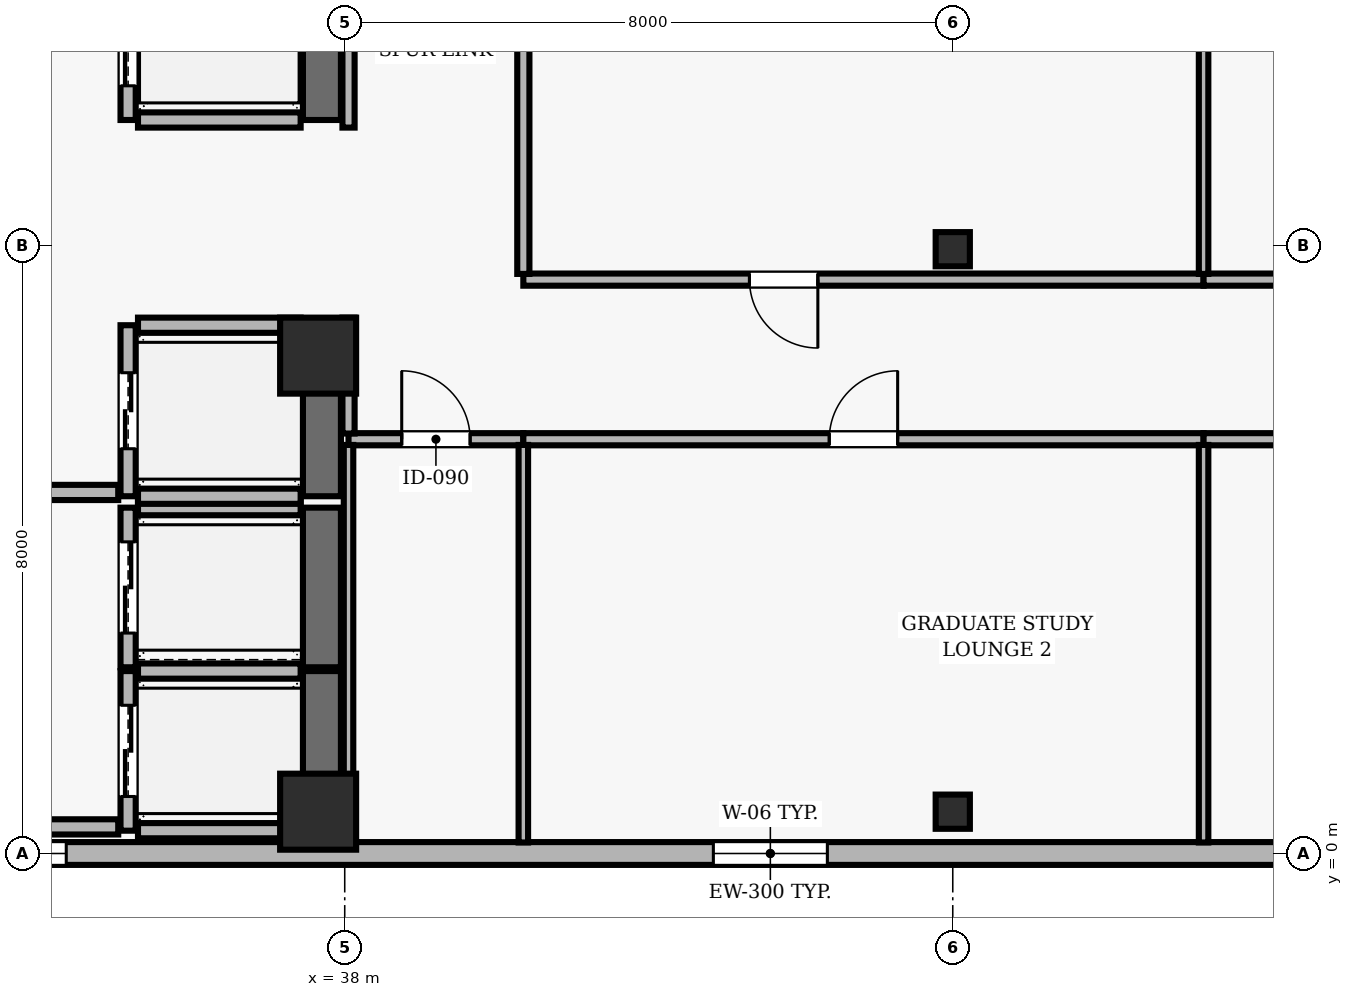
"""IFC4 building model, lengths in metres.
Left out: names, types, materials, properties, quantities, classifications, styles, units other than length and angle.
Written with IfcOpenShell. Run it as: python <this file> out.ifc"""

import sys

from ifc_helpers import new_model, si_unit, direction, frame, frame_2d, origin, origin_2d, place, context, subcontext, project, spatial, rectangle, hollow_rectangle, extrude, element, fill, save


model = new_model("IFC4")
c1 = context("Model", 3, precision=1e-05, world=origin(), true_north=direction((0.0, 1.0)))
c2 = subcontext(c1, "Body", "Model", "MODEL_VIEW")
j1 = project(units=[si_unit("LENGTHUNIT", "METRE"), si_unit("PLANEANGLEUNIT", "RADIAN")], contexts=[c1])
p1 = place(None, origin())
s1 = spatial("IfcSite", under=j1, at=p1, CompositionType="ELEMENT")
p2 = place(p1, origin())
s2 = spatial("IfcBuilding", under=s1, at=p2, CompositionType="ELEMENT")
p3 = place(p2, frame((0.0, 0.0, 218.7)))
s3 = spatial("IfcBuildingStorey", under=s2, at=p3, CompositionType="ELEMENT", Elevation=218.7)
for number, where, z_axis, x_axis in (
    (1, (37.65, 0.55, 0.0), (0.0, 0.0, 1.0), (1.0, 0.0, 0.0)),
    (2, (37.65, 6.55, 0.0), (0.0, 0.0, 1.0), (1.0, 0.0, 0.0)),
):
    element("IfcColumn", number, at=place(p3, frame(where, z_axis=z_axis, x_axis=x_axis)), inside=s3, PredefinedType="COLUMN", context=c2, shape_type="SweptSolid", body=[
        extrude(rectangle(XDim=1.0, YDim=1.0, at=origin_2d()), origin(), (0.0, 0.0, 1.0), 3.9),
    ])
for number, where, z_axis, x_axis in (
    (3, (46.0, 0.55, 0.0), (0.0, 0.0, 1.0), (1.0, 0.0, 0.0)),
    (4, (46.0, 7.95, 0.0), (0.0, 0.0, 1.0), (1.0, 0.0, 0.0)),
):
    element("IfcColumn", number, at=place(p3, frame(where, z_axis=z_axis, x_axis=x_axis)), inside=s3, PredefinedType="COLUMN", context=c2, shape_type="SweptSolid", body=[
        extrude(hollow_rectangle(XDim=0.45, YDim=0.45, WallThickness=0.02, at=origin_2d()), origin(), (0.0, 0.0, 1.0), 3.9),
    ])
p4 = place(p3, frame((24.5, 0.0, 0.0), z_axis=(0.0, 0.0, 1.0), x_axis=(1.0, 0.0, 0.0)))
e5 = element("IfcWall", 5, at=p4, inside=s3, PredefinedType="SOLIDWALL", context=c2, shape_type="SweptSolid", body=[
    extrude(rectangle(XDim=38.2, YDim=0.3, at=frame_2d((19.1, 0.0))), origin(), (0.0, 0.0, 1.0), 3.69),
])
p5 = place(p4, frame((1.979, 0.0, 0.9)))
e6 = element("IfcOpeningElement", 6, at=p5, cuts=e5, PredefinedType="OPENING", context=c2, shape_type="SweptSolid", body=[
    extrude(rectangle(XDim=1.5, YDim=1.8, at=frame_2d((0.75, 0.9))), frame((0.0, 0.16, 0.0), z_axis=(0.0, -1.0, 0.0), x_axis=(1.0, 0.0, 0.0)), (0.0, 0.0, 1.0), 0.32),
])
p6 = place(p4, frame((8.336, 0.0, 0.9)))
e7 = element("IfcOpeningElement", 7, at=p6, cuts=e5, PredefinedType="OPENING", context=c2, shape_type="SweptSolid", body=[
    extrude(rectangle(XDim=1.5, YDim=1.8, at=frame_2d((0.75, 0.9))), frame((0.0, 0.16, 0.0), z_axis=(0.0, -1.0, 0.0), x_axis=(1.0, 0.0, 0.0)), (0.0, 0.0, 1.0), 0.32),
])
p7 = place(p4, frame((18.35, 0.0, 0.9)))
e8 = element("IfcOpeningElement", 8, at=p7, cuts=e5, PredefinedType="OPENING", context=c2, shape_type="SweptSolid", body=[
    extrude(rectangle(XDim=1.5, YDim=1.8, at=frame_2d((0.75, 0.9))), frame((0.0, 0.16, 0.0), z_axis=(0.0, -1.0, 0.0), x_axis=(1.0, 0.0, 0.0)), (0.0, 0.0, 1.0), 0.32),
])
p8 = place(p4, frame((29.264, 0.0, 0.9)))
e9 = element("IfcOpeningElement", 9, at=p8, cuts=e5, PredefinedType="OPENING", context=c2, shape_type="SweptSolid", body=[
    extrude(rectangle(XDim=1.5, YDim=1.8, at=frame_2d((0.75, 0.9))), frame((0.0, 0.16, 0.0), z_axis=(0.0, -1.0, 0.0), x_axis=(1.0, 0.0, 0.0)), (0.0, 0.0, 1.0), 0.32),
])
p9 = place(p4, frame((34.721, 0.0, 0.9)))
e10 = element("IfcOpeningElement", 10, at=p9, cuts=e5, PredefinedType="OPENING", context=c2, shape_type="SweptSolid", body=[
    extrude(rectangle(XDim=1.5, YDim=1.8, at=frame_2d((0.75, 0.9))), frame((0.0, 0.16, 0.0), z_axis=(0.0, -1.0, 0.0), x_axis=(1.0, 0.0, 0.0)), (0.0, 0.0, 1.0), 0.32),
])
p10 = place(p3, frame((35.15, 2.4, 0.0), z_axis=(0.0, 0.0, 1.0), x_axis=(0.0, -1.0, 0.0)))
e11 = element("IfcWall", 11, at=p10, inside=s3, PredefinedType="SOLIDWALL", context=c2, shape_type="SweptSolid", body=[
    extrude(rectangle(XDim=2.1, YDim=0.2, at=frame_2d((1.05, 0.0))), origin(), (0.0, 0.0, 1.0), 3.69),
])
p11 = place(p10, frame((0.45, 0.0, 0.0)))
e12 = element("IfcOpeningElement", 12, at=p11, cuts=e11, PredefinedType="OPENING", context=c2, shape_type="SweptSolid", body=[
    extrude(rectangle(XDim=1.2, YDim=2.15, at=frame_2d((0.6, 1.075))), frame((0.0, 0.11, 0.0), z_axis=(0.0, -1.0, 0.0), x_axis=(1.0, 0.0, 0.0)), (0.0, 0.0, 1.0), 0.22),
])
p12 = place(p3, frame((37.7, 0.3, 0.0), z_axis=(0.0, 0.0, 1.0), x_axis=(0.0, 1.0, 0.0)))
e13 = element("IfcWall", 13, at=p12, inside=s3, PredefinedType="SHEAR", context=c2, shape_type="SweptSolid", body=[
    extrude(rectangle(XDim=2.1, YDim=0.5, at=frame_2d((1.05, 0.0))), origin(), (0.0, 0.0, 1.0), 3.69),
])
for number, where, z_axis, x_axis in (
    (14, (35.28, 0.3, 0.0), (0.0, 0.0, 1.0), (1.0, 0.0, 0.0)),
    (15, (37.42, 2.4, 0.0), (0.0, 0.0, 1.0), (-1.0, 0.0, 0.0)),
):
    element("IfcWall", number, at=place(p3, frame(where, z_axis=z_axis, x_axis=x_axis)), inside=s3, PredefinedType="SOLIDWALL", context=c2, shape_type="SweptSolid", body=[
        extrude(rectangle(XDim=2.14, YDim=0.2, at=frame_2d((1.07, 0.0))), origin(), (0.0, 0.0, 1.0), 3.69),
    ])
p13 = place(p3, frame((35.15, 4.55, 0.0), z_axis=(0.0, 0.0, 1.0), x_axis=(0.0, -1.0, 0.0)))
e16 = element("IfcWall", 16, at=p13, inside=s3, PredefinedType="SOLIDWALL", context=c2, shape_type="SweptSolid", body=[
    extrude(rectangle(XDim=2.1, YDim=0.2, at=frame_2d((1.05, 0.0))), origin(), (0.0, 0.0, 1.0), 3.69),
])
p14 = place(p13, frame((0.45, 0.0, 0.0)))
e17 = element("IfcOpeningElement", 17, at=p14, cuts=e16, PredefinedType="OPENING", context=c2, shape_type="SweptSolid", body=[
    extrude(rectangle(XDim=1.2, YDim=2.15, at=frame_2d((0.6, 1.075))), frame((0.0, 0.11, 0.0), z_axis=(0.0, -1.0, 0.0), x_axis=(1.0, 0.0, 0.0)), (0.0, 0.0, 1.0), 0.22),
])
p15 = place(p3, frame((37.7, 2.45, 0.0), z_axis=(0.0, 0.0, 1.0), x_axis=(0.0, 1.0, 0.0)))
e18 = element("IfcWall", 18, at=p15, inside=s3, PredefinedType="SHEAR", context=c2, shape_type="SweptSolid", body=[
    extrude(rectangle(XDim=2.1, YDim=0.5, at=frame_2d((1.05, 0.0))), origin(), (0.0, 0.0, 1.0), 3.69),
])
p16 = place(p3, frame((37.42, 4.55, 0.0), z_axis=(0.0, 0.0, 1.0), x_axis=(-1.0, 0.0, 0.0)))
e19 = element("IfcWall", 19, at=p16, inside=s3, PredefinedType="SOLIDWALL", context=c2, shape_type="SweptSolid", body=[
    extrude(rectangle(XDim=2.14, YDim=0.2, at=frame_2d((1.07, 0.0))), origin(), (0.0, 0.0, 1.0), 3.69),
])
p17 = place(p3, frame((35.15, 6.95, 0.0), z_axis=(0.0, 0.0, 1.0), x_axis=(0.0, -1.0, 0.0)))
e20 = element("IfcWall", 20, at=p17, inside=s3, PredefinedType="SOLIDWALL", context=c2, shape_type="SweptSolid", body=[
    extrude(rectangle(XDim=2.25, YDim=0.2, at=frame_2d((1.125, 0.0))), origin(), (0.0, 0.0, 1.0), 3.69),
])
p18 = place(p17, frame((0.625, 0.0, 0.0)))
e21 = element("IfcOpeningElement", 21, at=p18, cuts=e20, PredefinedType="OPENING", context=c2, shape_type="SweptSolid", body=[
    extrude(rectangle(XDim=1.0, YDim=2.1, at=frame_2d((0.5, 1.05))), frame((0.0, 0.11, 0.0), z_axis=(0.0, -1.0, 0.0), x_axis=(1.0, 0.0, 0.0)), (0.0, 0.0, 1.0), 0.22),
])
p19 = place(p3, frame((37.7, 4.7, 0.0), z_axis=(0.0, 0.0, 1.0), x_axis=(0.0, 1.0, 0.0)))
e22 = element("IfcWall", 22, at=p19, inside=s3, PredefinedType="SHEAR", context=c2, shape_type="SweptSolid", body=[
    extrude(rectangle(XDim=2.25, YDim=0.5, at=frame_2d((1.125, 0.0))), origin(), (0.0, 0.0, 1.0), 3.69),
])
for number, where, z_axis, x_axis in (
    (23, (35.28, 4.7, 0.0), (0.0, 0.0, 1.0), (1.0, 0.0, 0.0)),
    (24, (37.42, 6.95, 0.0), (0.0, 0.0, 1.0), (-1.0, 0.0, 0.0)),
):
    element("IfcWall", number, at=place(p3, frame(where, z_axis=z_axis, x_axis=x_axis)), inside=s3, PredefinedType="SOLIDWALL", context=c2, shape_type="SweptSolid", body=[
        extrude(rectangle(XDim=2.14, YDim=0.2, at=frame_2d((1.07, 0.0))), origin(), (0.0, 0.0, 1.0), 3.69),
    ])
p20 = place(p3, frame((35.15, 11.55, 0.0), z_axis=(0.0, 0.0, 1.0), x_axis=(0.0, -1.0, 0.0)))
e25 = element("IfcWall", 25, at=p20, inside=s3, PredefinedType="SOLIDWALL", context=c2, shape_type="SweptSolid", body=[
    extrude(rectangle(XDim=1.9, YDim=0.2, at=frame_2d((0.95, 0.0))), origin(), (0.0, 0.0, 1.0), 3.69),
])
p21 = place(p20, frame((0.45, 0.0, 0.0)))
e26 = element("IfcOpeningElement", 26, at=p21, cuts=e25, PredefinedType="OPENING", context=c2, shape_type="SweptSolid", body=[
    extrude(rectangle(XDim=1.0, YDim=2.1, at=frame_2d((0.5, 1.05))), frame((0.0, 0.11, 0.0), z_axis=(0.0, -1.0, 0.0), x_axis=(1.0, 0.0, 0.0)), (0.0, 0.0, 1.0), 0.22),
])
p22 = place(p3, frame((37.7, 9.65, 0.0), z_axis=(0.0, 0.0, 1.0), x_axis=(0.0, 1.0, 0.0)))
e27 = element("IfcWall", 27, at=p22, inside=s3, PredefinedType="SHEAR", context=c2, shape_type="SweptSolid", body=[
    extrude(rectangle(XDim=1.9, YDim=0.5, at=frame_2d((0.95, 0.0))), origin(), (0.0, 0.0, 1.0), 3.69),
])
p23 = place(p3, frame((35.28, 9.65, 0.0), z_axis=(0.0, 0.0, 1.0), x_axis=(1.0, 0.0, 0.0)))
e28 = element("IfcWall", 28, at=p23, inside=s3, PredefinedType="SOLIDWALL", context=c2, shape_type="SweptSolid", body=[
    extrude(rectangle(XDim=2.14, YDim=0.2, at=frame_2d((1.07, 0.0))), origin(), (0.0, 0.0, 1.0), 3.69),
])
p24 = place(p3, frame((31.65, 0.35, 0.0), z_axis=(0.0, 0.0, 1.0), x_axis=(1.0, 0.0, 0.0)))
e29 = element("IfcWall", 29, at=p24, inside=s3, PredefinedType="SOLIDWALL", context=c2, shape_type="SweptSolid", body=[
    extrude(rectangle(XDim=3.37, YDim=0.2, at=frame_2d((1.685, 0.0))), origin(), (0.0, 0.0, 1.0), 3.69),
])
p25 = place(p3, frame((35.02, 4.75, 0.0), z_axis=(0.0, 0.0, 1.0), x_axis=(-1.0, 0.0, 0.0)))
e30 = element("IfcWall", 30, at=p25, inside=s3, PredefinedType="SOLIDWALL", context=c2, shape_type="SweptSolid", body=[
    extrude(rectangle(XDim=3.11, YDim=0.2, at=frame_2d((1.555, 0.0))), origin(), (0.0, 0.0, 1.0), 3.69),
])
p26 = place(p25, frame((1.03, 0.0, 0.0)))
e31 = element("IfcOpeningElement", 31, at=p26, cuts=e30, PredefinedType="OPENING", context=c2, shape_type="SweptSolid", body=[
    extrude(rectangle(XDim=1.05, YDim=2.15, at=frame_2d((0.525, 1.075))), frame((0.0, 0.11, 0.0), z_axis=(0.0, -1.0, 0.0), x_axis=(1.0, 0.0, 0.0)), (0.0, 0.0, 1.0), 0.22),
])
p27 = place(p3, frame((38.05, 5.45, 0.0), z_axis=(0.0, 0.0, 1.0), x_axis=(1.0, 0.0, 0.0)))
e32 = element("IfcWall", 32, at=p27, inside=s3, PredefinedType="PARTITIONING", context=c2, shape_type="SweptSolid", body=[
    extrude(rectangle(XDim=2.3, YDim=0.16, at=frame_2d((1.15, 0.0))), origin(), (0.0, 0.0, 1.0), 3.372),
])
p28 = place(p27, frame((0.7, 0.0, 0.0)))
e33 = element("IfcOpeningElement", 33, at=p28, cuts=e32, PredefinedType="OPENING", context=c2, shape_type="SweptSolid", body=[
    extrude(rectangle(XDim=0.9, YDim=2.1, at=frame_2d((0.45, 1.05))), frame((0.0, 0.09, 0.0), z_axis=(0.0, -1.0, 0.0), x_axis=(1.0, 0.0, 0.0)), (0.0, 0.0, 1.0), 0.18),
])
p29 = place(p3, frame((40.35, 5.45, 0.0), z_axis=(0.0, 0.0, 1.0), x_axis=(1.0, 0.0, 0.0)))
e34 = element("IfcWall", 34, at=p29, inside=s3, PredefinedType="PARTITIONING", context=c2, shape_type="SweptSolid", body=[
    extrude(rectangle(XDim=8.95, YDim=0.16, at=frame_2d((4.475, 0.0))), origin(), (0.0, 0.0, 1.0), 3.372),
])
p30 = place(p29, frame((4.025, 0.0, 0.0)))
e35 = element("IfcOpeningElement", 35, at=p30, cuts=e34, PredefinedType="OPENING", context=c2, shape_type="SweptSolid", body=[
    extrude(rectangle(XDim=0.9, YDim=2.1, at=frame_2d((0.45, 1.05))), frame((0.0, 0.09, 0.0), z_axis=(0.0, -1.0, 0.0), x_axis=(1.0, 0.0, 0.0)), (0.0, 0.0, 1.0), 0.18),
])
p31 = place(p3, frame((49.3, 5.45, 0.0), z_axis=(0.0, 0.0, 1.0), x_axis=(1.0, 0.0, 0.0)))
e36 = element("IfcWall", 36, at=p31, inside=s3, PredefinedType="PARTITIONING", context=c2, shape_type="SweptSolid", body=[
    extrude(rectangle(XDim=8.5, YDim=0.16, at=frame_2d((4.25, 0.0))), origin(), (0.0, 0.0, 1.0), 3.372),
])
p32 = place(p31, frame((3.8, 0.0, 0.0)))
e37 = element("IfcOpeningElement", 37, at=p32, cuts=e36, PredefinedType="OPENING", context=c2, shape_type="SweptSolid", body=[
    extrude(rectangle(XDim=0.9, YDim=2.1, at=frame_2d((0.45, 1.05))), frame((0.0, 0.09, 0.0), z_axis=(0.0, -1.0, 0.0), x_axis=(1.0, 0.0, 0.0)), (0.0, 0.0, 1.0), 0.18),
])
p33 = place(p3, frame((49.3, 7.55, 0.0), z_axis=(0.0, 0.0, 1.0), x_axis=(-1.0, 0.0, 0.0)))
e38 = element("IfcWall", 38, at=p33, inside=s3, PredefinedType="PARTITIONING", context=c2, shape_type="SweptSolid", body=[
    extrude(rectangle(XDim=8.95, YDim=0.16, at=frame_2d((4.475, 0.0))), origin(), (0.0, 0.0, 1.0), 3.146),
])
p34 = place(p33, frame((5.075, 0.0, 0.0)))
e39 = element("IfcOpeningElement", 39, at=p34, cuts=e38, PredefinedType="OPENING", context=c2, shape_type="SweptSolid", body=[
    extrude(rectangle(XDim=0.9, YDim=2.1, at=frame_2d((0.45, 1.05))), frame((0.0, 0.09, 0.0), z_axis=(0.0, -1.0, 0.0), x_axis=(1.0, 0.0, 0.0)), (0.0, 0.0, 1.0), 0.18),
])
p35 = place(p3, frame((57.8, 7.55, 0.0), z_axis=(0.0, 0.0, 1.0), x_axis=(-1.0, 0.0, 0.0)))
e40 = element("IfcWall", 40, at=p35, inside=s3, PredefinedType="PARTITIONING", context=c2, shape_type="SweptSolid", body=[
    extrude(rectangle(XDim=8.5, YDim=0.16, at=frame_2d((4.25, 0.0))), origin(), (0.0, 0.0, 1.0), 3.146),
])
p36 = place(p35, frame((3.45, 0.0, 0.0)))
e41 = element("IfcOpeningElement", 41, at=p36, cuts=e40, PredefinedType="OPENING", context=c2, shape_type="SweptSolid", body=[
    extrude(rectangle(XDim=0.9, YDim=2.1, at=frame_2d((0.45, 1.05))), frame((0.0, 0.09, 0.0), z_axis=(0.0, -1.0, 0.0), x_axis=(1.0, 0.0, 0.0)), (0.0, 0.0, 1.0), 0.18),
])
p37 = place(p3, frame((38.05, 5.375, 0.0), z_axis=(0.0, 0.0, 1.0), x_axis=(0.0, -1.0, 0.0)))
e42 = element("IfcWall", 42, at=p37, inside=s3, PredefinedType="PARTITIONING", context=c2, shape_type="SweptSolid", body=[
    extrude(rectangle(XDim=5.23, YDim=0.125, at=frame_2d((2.615, 0.0))), origin(), (0.0, 0.0, 1.0), 3.146),
])
p38 = place(p3, frame((38.05, 7.05, 0.0), z_axis=(0.0, 0.0, 1.0), x_axis=(0.0, -1.0, 0.0)))
e43 = element("IfcWall", 43, at=p38, inside=s3, PredefinedType="PARTITIONING", context=c2, shape_type="SweptSolid", body=[
    extrude(rectangle(XDim=1.525, YDim=0.16, at=frame_2d((0.763, 0.0))), origin(), (0.0, 0.0, 1.0), 3.146),
])
p39 = place(p3, frame((38.05, 15.925, 0.0), z_axis=(0.0, 0.0, 1.0), x_axis=(0.0, -1.0, 0.0)))
e44 = element("IfcWall", 44, at=p39, inside=s3, PredefinedType="PARTITIONING", context=c2, shape_type="SweptSolid", body=[
    extrude(rectangle(XDim=6.375, YDim=0.16, at=frame_2d((3.188, 0.0))), origin(), (0.0, 0.0, 1.0), 3.146),
])
p40 = place(p3, frame((40.35, 0.145, 0.0), z_axis=(0.0, 0.0, 1.0), x_axis=(0.0, 1.0, 0.0)))
e45 = element("IfcWall", 45, at=p40, inside=s3, PredefinedType="PARTITIONING", context=c2, shape_type="SweptSolid", body=[
    extrude(rectangle(XDim=5.23, YDim=0.125, at=frame_2d((2.615, 0.0))), origin(), (0.0, 0.0, 1.0), 3.69),
])
p41 = place(p3, frame((40.35, 7.625, 0.0), z_axis=(0.0, 0.0, 1.0), x_axis=(0.0, 1.0, 0.0)))
e46 = element("IfcWall", 46, at=p41, inside=s3, PredefinedType="PARTITIONING", context=c2, shape_type="SweptSolid", body=[
    extrude(rectangle(XDim=8.3, YDim=0.16, at=frame_2d((4.15, 0.0))), origin(), (0.0, 0.0, 1.0), 3.69),
])
p42 = place(p3, frame((49.3, 0.145, 0.0), z_axis=(0.0, 0.0, 1.0), x_axis=(0.0, 1.0, 0.0)))
e47 = element("IfcWall", 47, at=p42, inside=s3, PredefinedType="PARTITIONING", context=c2, shape_type="SweptSolid", body=[
    extrude(rectangle(XDim=5.23, YDim=0.125, at=frame_2d((2.615, 0.0))), origin(), (0.0, 0.0, 1.0), 3.69),
])
p43 = place(p3, frame((49.3, 7.625, 0.0), z_axis=(0.0, 0.0, 1.0), x_axis=(0.0, 1.0, 0.0)))
e48 = element("IfcWall", 48, at=p43, inside=s3, PredefinedType="PARTITIONING", context=c2, shape_type="SweptSolid", body=[
    extrude(rectangle(XDim=8.23, YDim=0.125, at=frame_2d((4.115, 0.0))), origin(), (0.0, 0.0, 1.0), 3.69),
])
p44 = place(p6, origin())
e49 = element("IfcWindow", 49, at=p44, inside=s3, PartitioningType="SINGLE_PANEL", PredefinedType="WINDOW", context=c2, shape_type="SweptSolid", body=[
    extrude(rectangle(XDim=1.5, YDim=1.8, at=frame_2d((0.75, 0.9))), frame((0.0, 0.03, 0.0), z_axis=(0.0, -1.0, 0.0), x_axis=(1.0, 0.0, 0.0)), (0.0, 0.0, 1.0), 0.06),
])
fill(e7, e49)
p45 = place(p7, origin())
e50 = element("IfcWindow", 50, at=p45, inside=s3, PartitioningType="SINGLE_PANEL", PredefinedType="WINDOW", context=c2, shape_type="SweptSolid", body=[
    extrude(rectangle(XDim=1.5, YDim=1.8, at=frame_2d((0.75, 0.9))), frame((0.0, 0.03, 0.0), z_axis=(0.0, -1.0, 0.0), x_axis=(1.0, 0.0, 0.0)), (0.0, 0.0, 1.0), 0.06),
])
fill(e8, e50)
p46 = place(p11, origin())
e51 = element("IfcDoor", 51, at=p46, inside=s3, OperationType="DOUBLE_DOOR_SLIDING", PredefinedType="DOOR", context=c2, shape_type="SweptSolid", body=[
    extrude(rectangle(XDim=1.2, YDim=2.15, at=frame_2d((0.6, 1.075))), frame((0.0, 0.025, 0.0), z_axis=(0.0, -1.0, 0.0), x_axis=(1.0, 0.0, 0.0)), (0.0, 0.0, 1.0), 0.05),
])
fill(e12, e51)
p47 = place(p14, origin())
e52 = element("IfcDoor", 52, at=p47, inside=s3, OperationType="DOUBLE_DOOR_SLIDING", PredefinedType="DOOR", context=c2, shape_type="SweptSolid", body=[
    extrude(rectangle(XDim=1.2, YDim=2.15, at=frame_2d((0.6, 1.075))), frame((0.0, 0.025, 0.0), z_axis=(0.0, -1.0, 0.0), x_axis=(1.0, 0.0, 0.0)), (0.0, 0.0, 1.0), 0.05),
])
fill(e17, e52)
p48 = place(p18, origin())
e53 = element("IfcDoor", 53, at=p48, inside=s3, OperationType="DOUBLE_DOOR_SLIDING", PredefinedType="DOOR", context=c2, shape_type="SweptSolid", body=[
    extrude(rectangle(XDim=1.0, YDim=2.1, at=frame_2d((0.5, 1.05))), frame((0.0, 0.025, 0.0), z_axis=(0.0, -1.0, 0.0), x_axis=(1.0, 0.0, 0.0)), (0.0, 0.0, 1.0), 0.05),
])
fill(e21, e53)
p49 = place(p21, origin())
e54 = element("IfcDoor", 54, at=p49, inside=s3, OperationType="DOUBLE_DOOR_SLIDING", PredefinedType="DOOR", context=c2, shape_type="SweptSolid", body=[
    extrude(rectangle(XDim=1.0, YDim=2.1, at=frame_2d((0.5, 1.05))), frame((0.0, 0.025, 0.0), z_axis=(0.0, -1.0, 0.0), x_axis=(1.0, 0.0, 0.0)), (0.0, 0.0, 1.0), 0.05),
])
fill(e26, e54)
p50 = place(p28, origin())
e55 = element("IfcDoor", 55, at=p50, inside=s3, OperationType="SINGLE_SWING_LEFT", PredefinedType="DOOR", context=c2, shape_type="SweptSolid", body=[
    extrude(rectangle(XDim=0.9, YDim=2.1, at=frame_2d((0.45, 1.05))), frame((0.0, 0.025, 0.0), z_axis=(0.0, -1.0, 0.0), x_axis=(1.0, 0.0, 0.0)), (0.0, 0.0, 1.0), 0.05),
])
fill(e33, e55)
p51 = place(p30, origin())
e56 = element("IfcDoor", 56, at=p51, inside=s3, OperationType="SINGLE_SWING_RIGHT", PredefinedType="DOOR", context=c2, shape_type="SweptSolid", body=[
    extrude(rectangle(XDim=0.9, YDim=2.1, at=frame_2d((0.45, 1.05))), frame((0.0, 0.025, 0.0), z_axis=(0.0, -1.0, 0.0), x_axis=(1.0, 0.0, 0.0)), (0.0, 0.0, 1.0), 0.05),
])
fill(e35, e56)
p52 = place(p34, origin())
e57 = element("IfcDoor", 57, at=p52, inside=s3, OperationType="SINGLE_SWING_LEFT", PredefinedType="DOOR", context=c2, shape_type="SweptSolid", body=[
    extrude(rectangle(XDim=0.9, YDim=2.1, at=frame_2d((0.45, 1.05))), frame((0.0, 0.025, 0.0), z_axis=(0.0, -1.0, 0.0), x_axis=(1.0, 0.0, 0.0)), (0.0, 0.0, 1.0), 0.05),
])
fill(e39, e57)
save(model, sys.argv[1])
